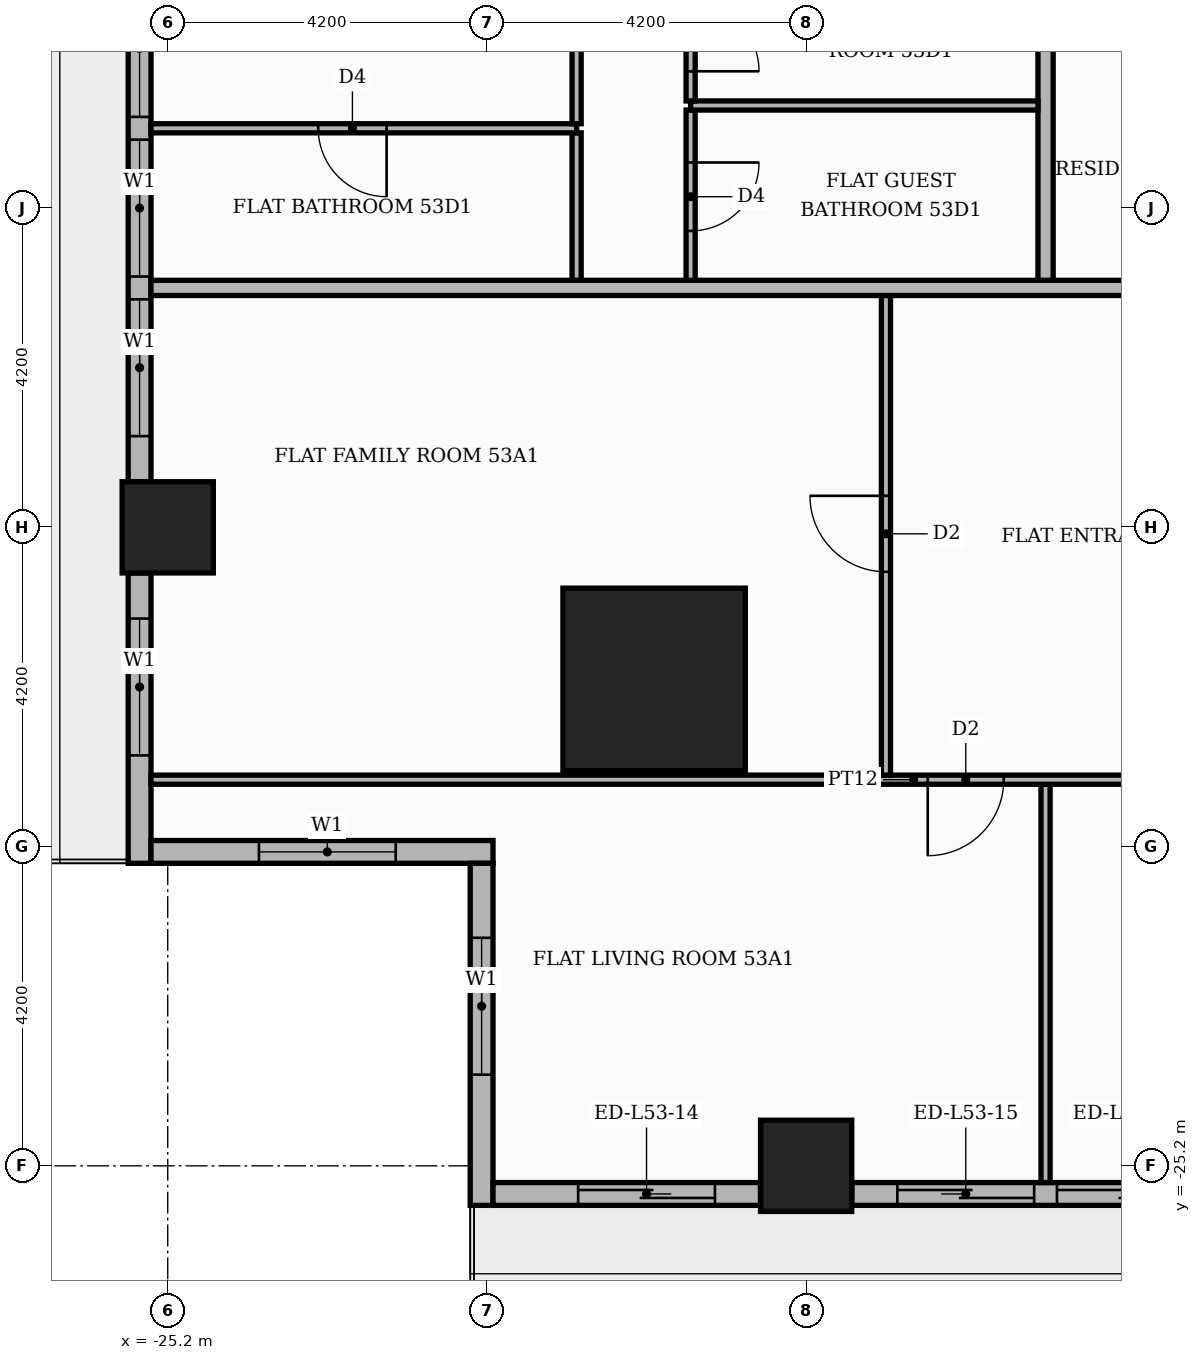
"""IFC4 building model, lengths in metres.
Left out: names, types, materials, properties, quantities, classifications, styles, units other than length and angle.
Written with IfcOpenShell. Run it as: python <this file> out.ifc"""

import sys

from ifc_helpers import new_model, si_unit, direction, frame, frame_2d, origin, origin_2d, place, context, subcontext, project, spatial, rectangle, extrude, element, fill, save


model = new_model("IFC4")
c1 = context("Model", 3, precision=1e-05, world=origin(), true_north=direction((0.0, 1.0)))
c2 = subcontext(c1, "Body", "Model", "MODEL_VIEW")
j1 = project(units=[si_unit("LENGTHUNIT", "METRE"), si_unit("PLANEANGLEUNIT", "RADIAN")], contexts=[c1])
p1 = place(None, origin())
s1 = spatial("IfcSite", under=j1, at=p1, CompositionType="ELEMENT")
p2 = place(p1, origin())
s2 = spatial("IfcBuilding", under=s1, at=p2, CompositionType="ELEMENT")
p3 = place(p2, frame((0.0, 0.0, 223.5)))
s3 = spatial("IfcBuildingStorey", under=s2, at=p3, CompositionType="ELEMENT", Elevation=223.5)
p4 = place(p3, frame((-18.8, -18.8, 0.0), z_axis=(0.0, 0.0, 1.0), x_axis=(1.0, 0.0, 0.0)))
e1 = element("IfcColumn", 1, at=p4, inside=s3, PredefinedType="COLUMN", context=c2, shape_type="SweptSolid", body=[
    extrude(rectangle(XDim=2.4, YDim=2.4, at=origin_2d()), origin(), (0.0, 0.0, 1.0), 3.9),
])
for number, where, z_axis, x_axis in (
    (2, (-16.8, -25.2, 0.0), (0.0, 0.0, 1.0), (1.0, 0.0, 0.0)),
    (3, (-25.2, -16.8, 0.0), (0.0, 0.0, 1.0), (1.0, 0.0, 0.0)),
):
    element("IfcColumn", number, at=place(p3, frame(where, z_axis=z_axis, x_axis=x_axis)), inside=s3, PredefinedType="COLUMN", context=c2, shape_type="SweptSolid", body=[
        extrude(rectangle(XDim=1.2, YDim=1.2, at=origin_2d()), origin(), (0.0, 0.0, 1.0), 3.9),
    ])
p5 = place(p3, frame((-25.57, -9.0, 0.0), z_axis=(0.0, 0.0, 1.0), x_axis=(0.0, -1.0, 0.0)))
e4 = element("IfcWall", 4, at=p5, inside=s3, PredefinedType="STANDARD", context=c2, shape_type="SweptSolid", body=[
    extrude(rectangle(XDim=7.2, YDim=0.3, at=frame_2d((3.6, 0.0))), origin(), (0.0, 0.0, 1.0), 3.48),
])
p6 = place(p5, frame((0.6, 0.0, 0.9)))
e5 = element("IfcOpeningElement", 5, at=p6, cuts=e4, PredefinedType="OPENING", context=c2, shape_type="SweptSolid", body=[
    extrude(rectangle(XDim=1.8, YDim=2.1, at=frame_2d((0.9, 1.05))), frame((0.0, 0.16, 0.0), z_axis=(0.0, -1.0, 0.0), x_axis=(1.0, 0.0, 0.0)), (0.0, 0.0, 1.0), 0.32),
])
p7 = place(p5, frame((2.7, 0.0, 0.9)))
e6 = element("IfcOpeningElement", 6, at=p7, cuts=e4, PredefinedType="OPENING", context=c2, shape_type="SweptSolid", body=[
    extrude(rectangle(XDim=1.8, YDim=2.1, at=frame_2d((0.9, 1.05))), frame((0.0, 0.16, 0.0), z_axis=(0.0, -1.0, 0.0), x_axis=(1.0, 0.0, 0.0)), (0.0, 0.0, 1.0), 0.32),
])
p8 = place(p5, frame((4.8, 0.0, 0.9)))
e7 = element("IfcOpeningElement", 7, at=p8, cuts=e4, PredefinedType="OPENING", context=c2, shape_type="SweptSolid", body=[
    extrude(rectangle(XDim=1.8, YDim=2.1, at=frame_2d((0.9, 1.05))), frame((0.0, 0.16, 0.0), z_axis=(0.0, -1.0, 0.0), x_axis=(1.0, 0.0, 0.0)), (0.0, 0.0, 1.0), 0.32),
])
p9 = place(p3, frame((-25.57, -17.4, 0.0), z_axis=(0.0, 0.0, 1.0), x_axis=(0.0, -1.0, 0.0)))
e8 = element("IfcWall", 8, at=p9, inside=s3, PredefinedType="STANDARD", context=c2, shape_type="SweptSolid", body=[
    extrude(rectangle(XDim=3.82, YDim=0.3, at=frame_2d((1.91, 0.0))), origin(), (0.0, 0.0, 1.0), 3.48),
])
p10 = place(p9, frame((0.6, 0.0, 0.9)))
e9 = element("IfcOpeningElement", 9, at=p10, cuts=e8, PredefinedType="OPENING", context=c2, shape_type="SweptSolid", body=[
    extrude(rectangle(XDim=1.8, YDim=2.1, at=frame_2d((0.9, 1.05))), frame((0.0, 0.16, 0.0), z_axis=(0.0, -1.0, 0.0), x_axis=(1.0, 0.0, 0.0)), (0.0, 0.0, 1.0), 0.32),
])
p11 = place(p3, frame((-25.42, -21.07, 0.0), z_axis=(0.0, 0.0, 1.0), x_axis=(1.0, 0.0, 0.0)))
e10 = element("IfcWall", 10, at=p11, inside=s3, PredefinedType="STANDARD", context=c2, shape_type="SweptSolid", body=[
    extrude(rectangle(XDim=4.5, YDim=0.3, at=frame_2d((2.25, 0.0))), origin(), (0.0, 0.0, 1.0), 3.48),
])
p12 = place(p11, frame((1.42, 0.0, 0.9)))
e11 = element("IfcOpeningElement", 11, at=p12, cuts=e10, PredefinedType="OPENING", context=c2, shape_type="SweptSolid", body=[
    extrude(rectangle(XDim=1.8, YDim=2.1, at=frame_2d((0.9, 1.05))), frame((0.0, 0.16, 0.0), z_axis=(0.0, -1.0, 0.0), x_axis=(1.0, 0.0, 0.0)), (0.0, 0.0, 1.0), 0.32),
])
p13 = place(p3, frame((-21.07, -21.22, 0.0), z_axis=(0.0, 0.0, 1.0), x_axis=(0.0, -1.0, 0.0)))
e12 = element("IfcWall", 12, at=p13, inside=s3, PredefinedType="STANDARD", context=c2, shape_type="SweptSolid", body=[
    extrude(rectangle(XDim=4.5, YDim=0.3, at=frame_2d((2.25, 0.0))), origin(), (0.0, 0.0, 1.0), 3.48),
])
p14 = place(p13, frame((0.98, 0.0, 0.9)))
e13 = element("IfcOpeningElement", 13, at=p14, cuts=e12, PredefinedType="OPENING", context=c2, shape_type="SweptSolid", body=[
    extrude(rectangle(XDim=1.8, YDim=2.1, at=frame_2d((0.9, 1.05))), frame((0.0, 0.16, 0.0), z_axis=(0.0, -1.0, 0.0), x_axis=(1.0, 0.0, 0.0)), (0.0, 0.0, 1.0), 0.32),
])
p15 = place(p3, frame((-20.92, -25.57, 0.0), z_axis=(0.0, 0.0, 1.0), x_axis=(1.0, 0.0, 0.0)))
e14 = element("IfcWall", 14, at=p15, inside=s3, PredefinedType="STANDARD", context=c2, shape_type="SweptSolid", body=[
    extrude(rectangle(XDim=3.52, YDim=0.3, at=frame_2d((1.76, 0.0))), origin(), (0.0, 0.0, 1.0), 3.48),
])
p16 = place(p15, frame((1.12, 0.0, 0.0)))
e15 = element("IfcOpeningElement", 15, at=p16, cuts=e14, PredefinedType="OPENING", context=c2, shape_type="SweptSolid", body=[
    extrude(rectangle(XDim=1.8, YDim=2.4, at=frame_2d((0.9, 1.2))), frame((0.0, 0.16, 0.0), z_axis=(0.0, -1.0, 0.0), x_axis=(1.0, 0.0, 0.0)), (0.0, 0.0, 1.0), 0.32),
])
p17 = place(p3, frame((-16.2, -25.57, 0.0), z_axis=(0.0, 0.0, 1.0), x_axis=(1.0, 0.0, 0.0)))
e16 = element("IfcWall", 16, at=p17, inside=s3, PredefinedType="STANDARD", context=c2, shape_type="SweptSolid", body=[
    extrude(rectangle(XDim=7.2, YDim=0.3, at=frame_2d((3.6, 0.0))), origin(), (0.0, 0.0, 1.0), 3.48),
])
p18 = place(p17, frame((0.6, 0.0, 0.0)))
e17 = element("IfcOpeningElement", 17, at=p18, cuts=e16, PredefinedType="OPENING", context=c2, shape_type="SweptSolid", body=[
    extrude(rectangle(XDim=1.8, YDim=2.4, at=frame_2d((0.9, 1.2))), frame((0.0, 0.16, 0.0), z_axis=(0.0, -1.0, 0.0), x_axis=(1.0, 0.0, 0.0)), (0.0, 0.0, 1.0), 0.32),
])
p19 = place(p17, frame((2.7, 0.0, 0.0)))
e18 = element("IfcOpeningElement", 18, at=p19, cuts=e16, PredefinedType="OPENING", context=c2, shape_type="SweptSolid", body=[
    extrude(rectangle(XDim=1.8, YDim=2.4, at=frame_2d((0.9, 1.2))), frame((0.0, 0.16, 0.0), z_axis=(0.0, -1.0, 0.0), x_axis=(1.0, 0.0, 0.0)), (0.0, 0.0, 1.0), 0.32),
])
p20 = place(p17, frame((4.8, 0.0, 0.9)))
e19 = element("IfcOpeningElement", 19, at=p20, cuts=e16, PredefinedType="OPENING", context=c2, shape_type="SweptSolid", body=[
    extrude(rectangle(XDim=1.8, YDim=2.1, at=frame_2d((0.9, 1.05))), frame((0.0, 0.16, 0.0), z_axis=(0.0, -1.0, 0.0), x_axis=(1.0, 0.0, 0.0)), (0.0, 0.0, 1.0), 0.32),
])
p21 = place(p3, frame((-13.65, -25.42, 0.0), z_axis=(0.0, 0.0, 1.0), x_axis=(0.0, 1.0, 0.0)))
e20 = element("IfcWall", 20, at=p21, inside=s3, PredefinedType="PARTITIONING", context=c2, shape_type="SweptSolid", body=[
    extrude(rectangle(XDim=5.24, YDim=0.12, at=frame_2d((2.62, 0.0))), origin(), (0.0, 0.0, 1.0), 3.48),
])
p22 = place(p3, frame((-25.42, -20.12, 0.0), z_axis=(0.0, 0.0, 1.0), x_axis=(1.0, 0.0, 0.0)))
e21 = element("IfcWall", 21, at=p22, inside=s3, PredefinedType="PARTITIONING", context=c2, shape_type="SweptSolid", body=[
    extrude(rectangle(XDim=20.07, YDim=0.12, at=frame_2d((10.035, 0.0))), origin(), (0.0, 0.0, 1.0), 3.48),
])
p23 = place(p22, frame((10.22, 0.0, 0.0)))
e22 = element("IfcOpeningElement", 22, at=p23, cuts=e21, PredefinedType="OPENING", context=c2, shape_type="SweptSolid", body=[
    extrude(rectangle(XDim=1.0, YDim=2.1, at=frame_2d((0.5, 1.05))), frame((0.0, 0.07, 0.0), z_axis=(0.0, -1.0, 0.0), x_axis=(1.0, 0.0, 0.0)), (0.0, 0.0, 1.0), 0.14),
])
p24 = place(p22, frame((13.42, 0.0, 0.0)))
e23 = element("IfcOpeningElement", 23, at=p24, cuts=e21, PredefinedType="OPENING", context=c2, shape_type="SweptSolid", body=[
    extrude(rectangle(XDim=0.9, YDim=2.1, at=frame_2d((0.45, 1.05))), frame((0.0, 0.07, 0.0), z_axis=(0.0, -1.0, 0.0), x_axis=(1.0, 0.0, 0.0)), (0.0, 0.0, 1.0), 0.14),
])
p25 = place(p3, frame((-15.75, -20.06, 0.0), z_axis=(0.0, 0.0, 1.0), x_axis=(0.0, 1.0, 0.0)))
e24 = element("IfcWall", 24, at=p25, inside=s3, PredefinedType="PARTITIONING", context=c2, shape_type="SweptSolid", body=[
    extrude(rectangle(XDim=6.31, YDim=0.12, at=frame_2d((3.155, 0.0))), origin(), (0.0, 0.0, 1.0), 3.48),
])
p26 = place(p25, frame((2.675, 0.0, 0.0)))
e25 = element("IfcOpeningElement", 25, at=p26, cuts=e24, PredefinedType="OPENING", context=c2, shape_type="SweptSolid", body=[
    extrude(rectangle(XDim=1.0, YDim=2.1, at=frame_2d((0.5, 1.05))), frame((0.0, 0.07, 0.0), z_axis=(0.0, -1.0, 0.0), x_axis=(1.0, 0.0, 0.0)), (0.0, 0.0, 1.0), 0.14),
])
p27 = place(p3, frame((-25.42, -13.65, 0.0), z_axis=(0.0, 0.0, 1.0), x_axis=(1.0, 0.0, 0.0)))
e26 = element("IfcWall", 26, at=p27, inside=s3, PredefinedType="PARTITIONING", context=c2, shape_type="SweptSolid", body=[
    extrude(rectangle(XDim=39.07, YDim=0.2, at=frame_2d((19.535, 0.0))), origin(), (0.0, 0.0, 1.0), 3.48),
])
p28 = place(p27, frame((13.32, 0.0, 0.0)))
e27 = element("IfcOpeningElement", 27, at=p28, cuts=e26, PredefinedType="OPENING", context=c2, shape_type="SweptSolid", body=[
    extrude(rectangle(XDim=1.1, YDim=2.4, at=frame_2d((0.55, 1.2))), frame((0.0, 0.11, 0.0), z_axis=(0.0, -1.0, 0.0), x_axis=(1.0, 0.0, 0.0)), (0.0, 0.0, 1.0), 0.22),
])
p29 = place(p27, frame((23.82, 0.0, 0.0)))
e28 = element("IfcOpeningElement", 28, at=p29, cuts=e26, PredefinedType="OPENING", context=c2, shape_type="SweptSolid", body=[
    extrude(rectangle(XDim=1.1, YDim=2.4, at=frame_2d((0.55, 1.2))), frame((0.0, 0.11, 0.0), z_axis=(0.0, -1.0, 0.0), x_axis=(1.0, 0.0, 0.0)), (0.0, 0.0, 1.0), 0.22),
])
p30 = place(p3, frame((-19.82, -13.55, 0.0), z_axis=(0.0, 0.0, 1.0), x_axis=(0.0, 1.0, 0.0)))
e29 = element("IfcWall", 29, at=p30, inside=s3, PredefinedType="PARTITIONING", context=c2, shape_type="SweptSolid", body=[
    extrude(rectangle(XDim=1.94, YDim=0.12, at=frame_2d((0.97, 0.0))), origin(), (0.0, 0.0, 1.0), 3.48),
])
p31 = place(p3, frame((-18.32, -13.55, 0.0), z_axis=(0.0, 0.0, 1.0), x_axis=(0.0, 1.0, 0.0)))
e30 = element("IfcWall", 30, at=p31, inside=s3, PredefinedType="PARTITIONING", context=c2, shape_type="SweptSolid", body=[
    extrude(rectangle(XDim=2.24, YDim=0.12, at=frame_2d((1.12, 0.0))), origin(), (0.0, 0.0, 1.0), 3.48),
])
p32 = place(p31, frame((0.65, 0.0, 0.0)))
e31 = element("IfcOpeningElement", 31, at=p32, cuts=e30, PredefinedType="OPENING", context=c2, shape_type="SweptSolid", body=[
    extrude(rectangle(XDim=0.9, YDim=2.1, at=frame_2d((0.45, 1.05))), frame((0.0, 0.07, 0.0), z_axis=(0.0, -1.0, 0.0), x_axis=(1.0, 0.0, 0.0)), (0.0, 0.0, 1.0), 0.14),
])
p33 = place(p3, frame((-13.65, -13.55, 0.0), z_axis=(0.0, 0.0, 1.0), x_axis=(0.0, 1.0, 0.0)))
e32 = element("IfcWall", 32, at=p33, inside=s3, PredefinedType="PARTITIONING", context=c2, shape_type="SweptSolid", body=[
    extrude(rectangle(XDim=27.1, YDim=0.2, at=frame_2d((13.55, 0.0))), origin(), (0.0, 0.0, 1.0), 3.48),
])
p34 = place(p33, frame((23.5, 0.0, 0.0)))
e33 = element("IfcOpeningElement", 33, at=p34, cuts=e32, PredefinedType="OPENING", context=c2, shape_type="SweptSolid", body=[
    extrude(rectangle(XDim=1.1, YDim=2.4, at=frame_2d((0.55, 1.2))), frame((0.0, 0.11, 0.0), z_axis=(0.0, -1.0, 0.0), x_axis=(1.0, 0.0, 0.0)), (0.0, 0.0, 1.0), 0.22),
])
p35 = place(p3, frame((-25.42, -11.55, 0.0), z_axis=(0.0, 0.0, 1.0), x_axis=(1.0, 0.0, 0.0)))
e34 = element("IfcWall", 34, at=p35, inside=s3, PredefinedType="PARTITIONING", context=c2, shape_type="SweptSolid", body=[
    extrude(rectangle(XDim=5.6, YDim=0.12, at=frame_2d((2.8, 0.0))), origin(), (0.0, 0.0, 1.0), 3.48),
])
p36 = place(p35, frame((2.2, 0.0, 0.0)))
e35 = element("IfcOpeningElement", 35, at=p36, cuts=e34, PredefinedType="OPENING", context=c2, shape_type="SweptSolid", body=[
    extrude(rectangle(XDim=0.9, YDim=2.1, at=frame_2d((0.45, 1.05))), frame((0.0, 0.07, 0.0), z_axis=(0.0, -1.0, 0.0), x_axis=(1.0, 0.0, 0.0)), (0.0, 0.0, 1.0), 0.14),
])
p37 = place(p3, frame((-19.82, -11.49, 0.0), z_axis=(0.0, 0.0, 1.0), x_axis=(0.0, 1.0, 0.0)))
e36 = element("IfcWall", 36, at=p37, inside=s3, PredefinedType="PARTITIONING", context=c2, shape_type="SweptSolid", body=[
    extrude(rectangle(XDim=6.18, YDim=0.12, at=frame_2d((3.09, 0.0))), origin(), (0.0, 0.0, 1.0), 3.48),
])
p38 = place(p37, frame((2.64, 0.0, 0.0)))
e37 = element("IfcOpeningElement", 37, at=p38, cuts=e36, PredefinedType="OPENING", context=c2, shape_type="SweptSolid", body=[
    extrude(rectangle(XDim=0.9, YDim=2.1, at=frame_2d((0.45, 1.05))), frame((0.0, 0.07, 0.0), z_axis=(0.0, -1.0, 0.0), x_axis=(1.0, 0.0, 0.0)), (0.0, 0.0, 1.0), 0.14),
])
p39 = place(p3, frame((-18.32, -11.25, 0.0), z_axis=(0.0, 0.0, 1.0), x_axis=(1.0, 0.0, 0.0)))
e38 = element("IfcWall", 38, at=p39, inside=s3, PredefinedType="PARTITIONING", context=c2, shape_type="SweptSolid", body=[
    extrude(rectangle(XDim=4.57, YDim=0.12, at=frame_2d((2.285, 0.0))), origin(), (0.0, 0.0, 1.0), 3.48),
])
p40 = place(p3, frame((-18.32, -11.19, 0.0), z_axis=(0.0, 0.0, 1.0), x_axis=(0.0, 1.0, 0.0)))
e39 = element("IfcWall", 39, at=p40, inside=s3, PredefinedType="PARTITIONING", context=c2, shape_type="SweptSolid", body=[
    extrude(rectangle(XDim=1.68, YDim=0.12, at=frame_2d((0.84, 0.0))), origin(), (0.0, 0.0, 1.0), 3.48),
])
p41 = place(p40, frame((0.39, 0.0, 0.0)))
e40 = element("IfcOpeningElement", 40, at=p41, cuts=e39, PredefinedType="OPENING", context=c2, shape_type="SweptSolid", body=[
    extrude(rectangle(XDim=0.9, YDim=2.1, at=frame_2d((0.45, 1.05))), frame((0.0, 0.07, 0.0), z_axis=(0.0, -1.0, 0.0), x_axis=(1.0, 0.0, 0.0)), (0.0, 0.0, 1.0), 0.14),
])
p42 = place(p6, origin())
e41 = element("IfcWindow", 41, at=p42, inside=s3, PartitioningType="SINGLE_PANEL", PredefinedType="WINDOW", context=c2, shape_type="SweptSolid", body=[
    extrude(rectangle(XDim=1.8, YDim=2.1, at=frame_2d((0.9, 1.05))), frame((0.0, 0.03, 0.0), z_axis=(0.0, -1.0, 0.0), x_axis=(1.0, 0.0, 0.0)), (0.0, 0.0, 1.0), 0.06),
])
fill(e5, e41)
p43 = place(p7, origin())
e42 = element("IfcWindow", 42, at=p43, inside=s3, PartitioningType="SINGLE_PANEL", PredefinedType="WINDOW", context=c2, shape_type="SweptSolid", body=[
    extrude(rectangle(XDim=1.8, YDim=2.1, at=frame_2d((0.9, 1.05))), frame((0.0, 0.03, 0.0), z_axis=(0.0, -1.0, 0.0), x_axis=(1.0, 0.0, 0.0)), (0.0, 0.0, 1.0), 0.06),
])
fill(e6, e42)
p44 = place(p8, origin())
e43 = element("IfcWindow", 43, at=p44, inside=s3, PartitioningType="SINGLE_PANEL", PredefinedType="WINDOW", context=c2, shape_type="SweptSolid", body=[
    extrude(rectangle(XDim=1.8, YDim=2.1, at=frame_2d((0.9, 1.05))), frame((0.0, 0.03, 0.0), z_axis=(0.0, -1.0, 0.0), x_axis=(1.0, 0.0, 0.0)), (0.0, 0.0, 1.0), 0.06),
])
fill(e7, e43)
p45 = place(p10, origin())
e44 = element("IfcWindow", 44, at=p45, inside=s3, PartitioningType="SINGLE_PANEL", PredefinedType="WINDOW", context=c2, shape_type="SweptSolid", body=[
    extrude(rectangle(XDim=1.8, YDim=2.1, at=frame_2d((0.9, 1.05))), frame((0.0, 0.03, 0.0), z_axis=(0.0, -1.0, 0.0), x_axis=(1.0, 0.0, 0.0)), (0.0, 0.0, 1.0), 0.06),
])
fill(e9, e44)
p46 = place(p12, origin())
e45 = element("IfcWindow", 45, at=p46, inside=s3, PartitioningType="SINGLE_PANEL", PredefinedType="WINDOW", context=c2, shape_type="SweptSolid", body=[
    extrude(rectangle(XDim=1.8, YDim=2.1, at=frame_2d((0.9, 1.05))), frame((0.0, 0.03, 0.0), z_axis=(0.0, -1.0, 0.0), x_axis=(1.0, 0.0, 0.0)), (0.0, 0.0, 1.0), 0.06),
])
fill(e11, e45)
p47 = place(p14, origin())
e46 = element("IfcWindow", 46, at=p47, inside=s3, PartitioningType="SINGLE_PANEL", PredefinedType="WINDOW", context=c2, shape_type="SweptSolid", body=[
    extrude(rectangle(XDim=1.8, YDim=2.1, at=frame_2d((0.9, 1.05))), frame((0.0, 0.03, 0.0), z_axis=(0.0, -1.0, 0.0), x_axis=(1.0, 0.0, 0.0)), (0.0, 0.0, 1.0), 0.06),
])
fill(e13, e46)
p48 = place(p16, origin())
e47 = element("IfcDoor", 47, at=p48, inside=s3, OperationType="SLIDING_TO_RIGHT", PredefinedType="DOOR", context=c2, shape_type="SweptSolid", body=[
    extrude(rectangle(XDim=1.8, YDim=2.4, at=frame_2d((0.9, 1.2))), frame((0.0, 0.025, 0.0), z_axis=(0.0, -1.0, 0.0), x_axis=(1.0, 0.0, 0.0)), (0.0, 0.0, 1.0), 0.05),
])
fill(e15, e47)
p49 = place(p18, origin())
e48 = element("IfcDoor", 48, at=p49, inside=s3, OperationType="SLIDING_TO_LEFT", PredefinedType="DOOR", context=c2, shape_type="SweptSolid", body=[
    extrude(rectangle(XDim=1.8, YDim=2.4, at=frame_2d((0.9, 1.2))), frame((0.0, 0.025, 0.0), z_axis=(0.0, -1.0, 0.0), x_axis=(1.0, 0.0, 0.0)), (0.0, 0.0, 1.0), 0.05),
])
fill(e17, e48)
p50 = place(p19, origin())
e49 = element("IfcDoor", 49, at=p50, inside=s3, OperationType="SLIDING_TO_RIGHT", PredefinedType="DOOR", context=c2, shape_type="SweptSolid", body=[
    extrude(rectangle(XDim=1.8, YDim=2.4, at=frame_2d((0.9, 1.2))), frame((0.0, 0.025, 0.0), z_axis=(0.0, -1.0, 0.0), x_axis=(1.0, 0.0, 0.0)), (0.0, 0.0, 1.0), 0.05),
])
fill(e18, e49)
p51 = place(p26, origin())
e50 = element("IfcDoor", 50, at=p51, inside=s3, OperationType="SINGLE_SWING_RIGHT", PredefinedType="DOOR", context=c2, shape_type="SweptSolid", body=[
    extrude(rectangle(XDim=1.0, YDim=2.1, at=frame_2d((0.5, 1.05))), frame((0.0, 0.025, 0.0), z_axis=(0.0, -1.0, 0.0), x_axis=(1.0, 0.0, 0.0)), (0.0, 0.0, 1.0), 0.05),
])
fill(e25, e50)
p52 = place(p23, frame((1.0, 0.0, 0.0), z_axis=(0.0, 0.0, 1.0), x_axis=(-1.0, 0.0, 0.0)))
e51 = element("IfcDoor", 51, at=p52, inside=s3, OperationType="SINGLE_SWING_LEFT", PredefinedType="DOOR", context=c2, shape_type="SweptSolid", body=[
    extrude(rectangle(XDim=1.0, YDim=2.1, at=frame_2d((0.5, 1.05))), frame((0.0, 0.025, 0.0), z_axis=(0.0, -1.0, 0.0), x_axis=(1.0, 0.0, 0.0)), (0.0, 0.0, 1.0), 0.05),
])
fill(e22, e51)
p53 = place(p41, frame((0.9, 0.0, 0.0), z_axis=(0.0, 0.0, 1.0), x_axis=(-1.0, 0.0, 0.0)))
e52 = element("IfcDoor", 52, at=p53, inside=s3, OperationType="SINGLE_SWING_LEFT", PredefinedType="DOOR", context=c2, shape_type="SweptSolid", body=[
    extrude(rectangle(XDim=0.9, YDim=2.1, at=frame_2d((0.45, 1.05))), frame((0.0, 0.025, 0.0), z_axis=(0.0, -1.0, 0.0), x_axis=(1.0, 0.0, 0.0)), (0.0, 0.0, 1.0), 0.05),
])
fill(e40, e52)
p54 = place(p32, frame((0.9, 0.0, 0.0), z_axis=(0.0, 0.0, 1.0), x_axis=(-1.0, 0.0, 0.0)))
e53 = element("IfcDoor", 53, at=p54, inside=s3, OperationType="SINGLE_SWING_RIGHT", PredefinedType="DOOR", context=c2, shape_type="SweptSolid", body=[
    extrude(rectangle(XDim=0.9, YDim=2.1, at=frame_2d((0.45, 1.05))), frame((0.0, 0.025, 0.0), z_axis=(0.0, -1.0, 0.0), x_axis=(1.0, 0.0, 0.0)), (0.0, 0.0, 1.0), 0.05),
])
fill(e31, e53)
p55 = place(p36, frame((0.9, 0.0, 0.0), z_axis=(0.0, 0.0, 1.0), x_axis=(-1.0, 0.0, 0.0)))
e54 = element("IfcDoor", 54, at=p55, inside=s3, OperationType="SINGLE_SWING_RIGHT", PredefinedType="DOOR", context=c2, shape_type="SweptSolid", body=[
    extrude(rectangle(XDim=0.9, YDim=2.1, at=frame_2d((0.45, 1.05))), frame((0.0, 0.025, 0.0), z_axis=(0.0, -1.0, 0.0), x_axis=(1.0, 0.0, 0.0)), (0.0, 0.0, 1.0), 0.05),
])
fill(e35, e54)
save(model, sys.argv[1])
